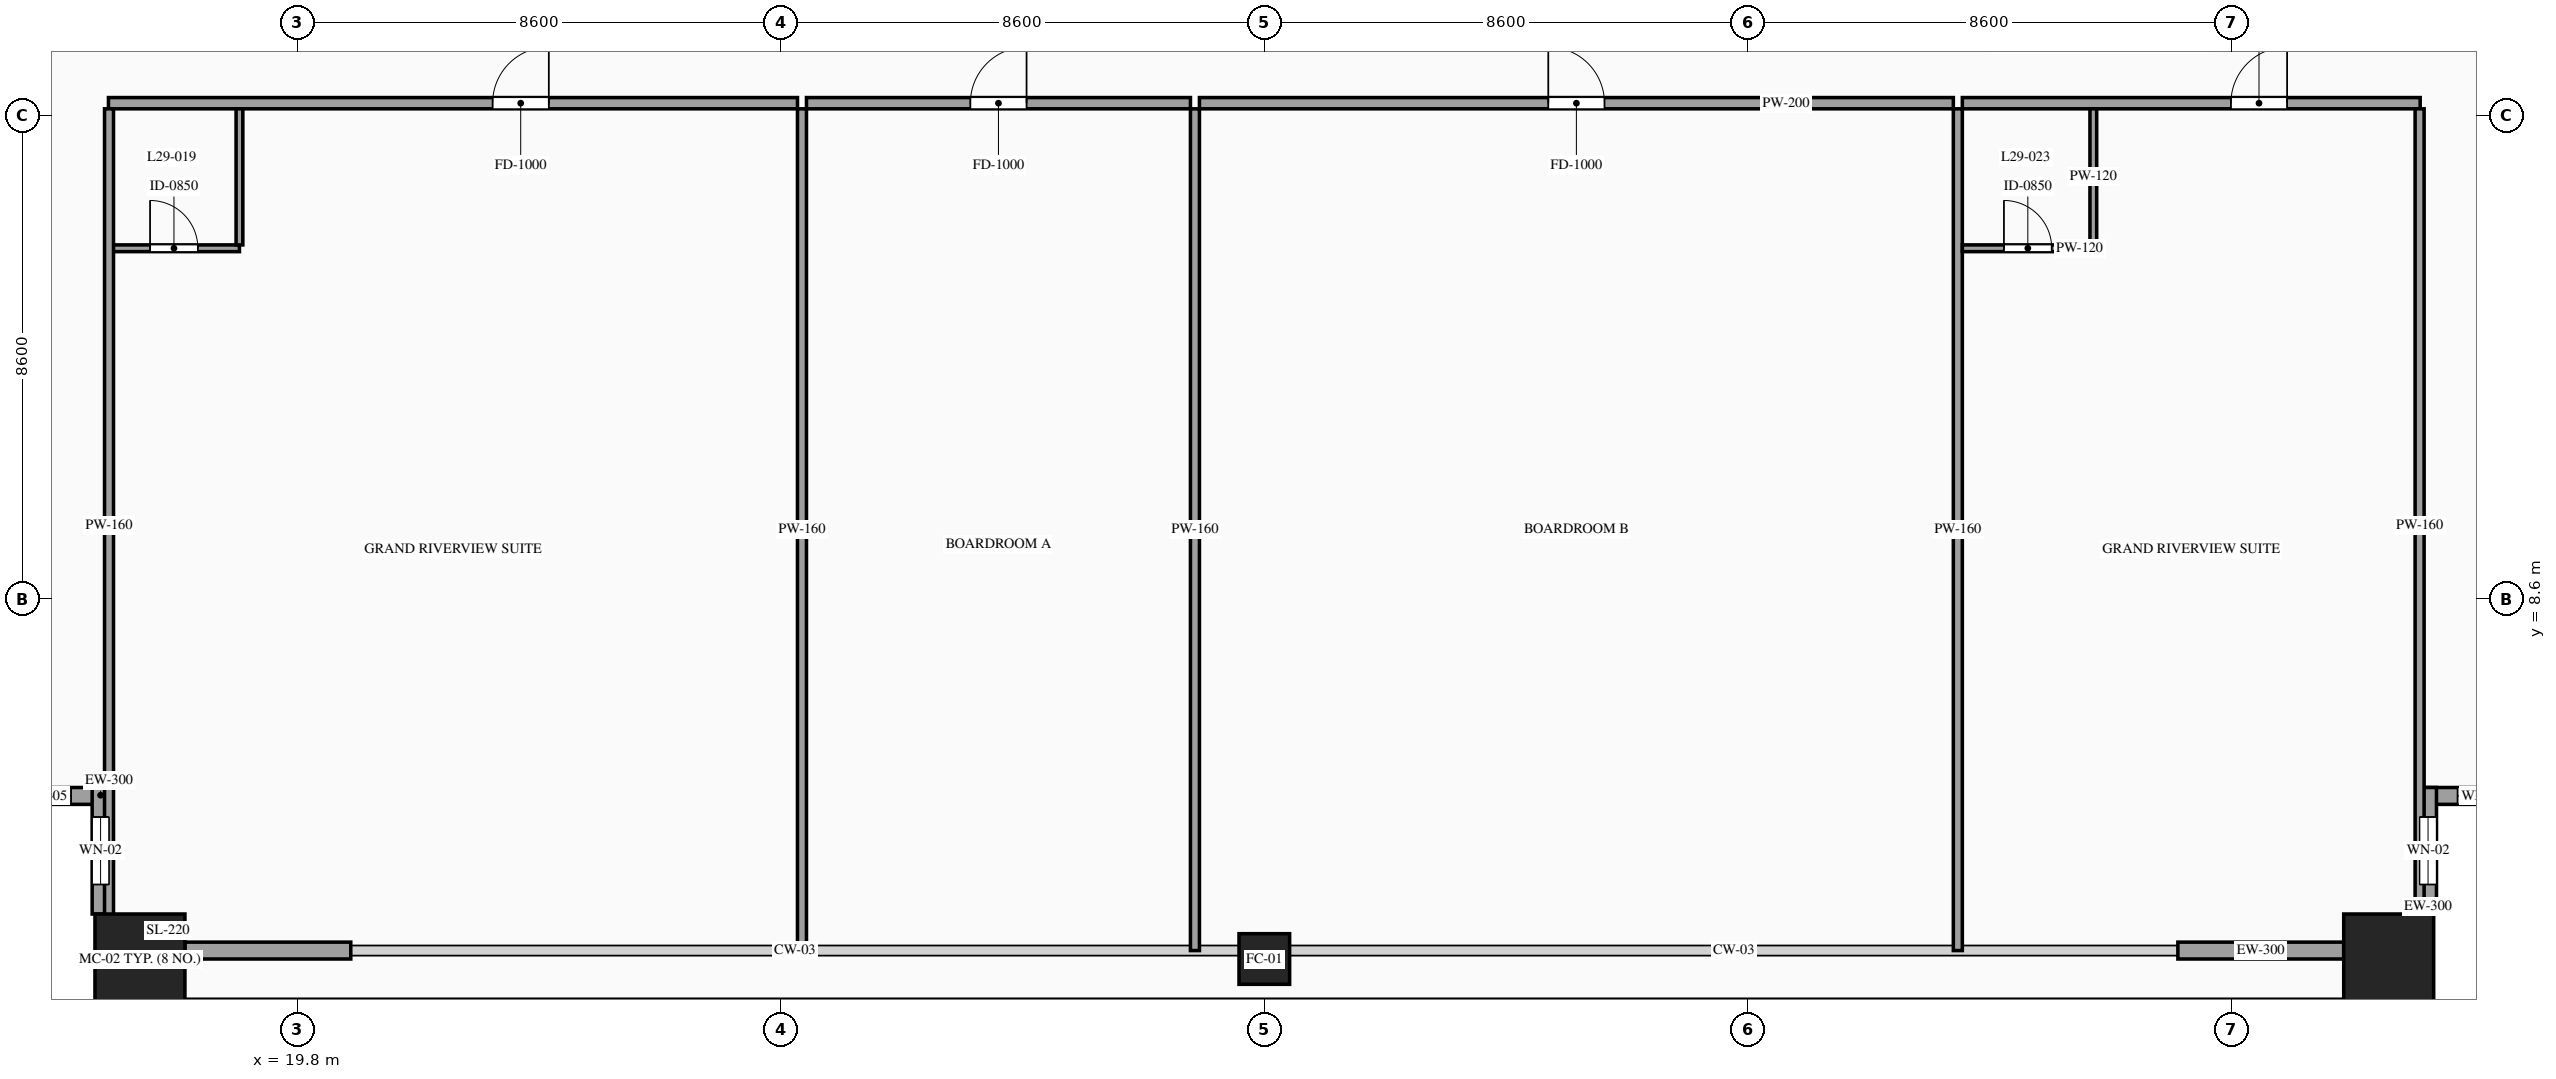
"""IFC4 building model, lengths in metres.
Left out: names, types, materials, properties, quantities, classifications, styles, units other than length and angle.
Written with IfcOpenShell. Run it as: python <this file> out.ifc"""

import sys

from ifc_helpers import new_model, si_unit, direction, frame, frame_2d, origin, origin_2d, place, context, subcontext, project, spatial, rectangle, hollow_rectangle, extrude, source, transform, mapped, element, fill, save


model = new_model("IFC4")
c1 = context("Model", 3, precision=1e-05, world=origin(), true_north=direction((0.0, 1.0)))
c2 = subcontext(c1, "Body", "Model", "MODEL_VIEW")
j1 = project(units=[si_unit("LENGTHUNIT", "METRE"), si_unit("PLANEANGLEUNIT", "RADIAN")], contexts=[c1])
p1 = place(None, origin())
s1 = spatial("IfcSite", under=j1, at=p1, CompositionType="ELEMENT")
p2 = place(p1, origin())
s2 = spatial("IfcBuilding", under=s1, at=p2, CompositionType="ELEMENT")
p3 = place(p2, frame((0.0, 0.0, 111.8)))
s3 = spatial("IfcBuildingStorey", under=s2, at=p3, CompositionType="ELEMENT", Elevation=111.8)
m1 = source(origin(), c2, "Body", "SweptSolid", [
    extrude(hollow_rectangle(XDim=1.6, YDim=1.6, WallThickness=0.07, at=origin_2d()), origin(), (0.0, 0.0, 1.0), 3.6),
])
p4 = place(p3, frame((17.0, 2.2, 0.0), z_axis=(0.0, 0.0, 1.0), x_axis=(1.0, 0.0, 0.0)))
e1 = element("IfcColumn", 1, at=p4, inside=s3, PredefinedType="COLUMN", context=c2, shape_type="MappedRepresentation", body=[
    mapped(m1, transform((0.0, 0.0, 0.0), scale=1.0)),
])
m2 = source(origin(), c2, "Body", "SweptSolid", [
    extrude(hollow_rectangle(XDim=0.9, YDim=0.9, WallThickness=0.042, at=origin_2d()), origin(), (0.0, 0.0, 1.0), 3.6),
])
p5 = place(p3, frame((37.0, 2.2, 0.0), z_axis=(0.0, 0.0, 1.0), x_axis=(1.0, 0.0, 0.0)))
e2 = element("IfcColumn", 2, at=p5, inside=s3, PredefinedType="COLUMN", context=c2, shape_type="MappedRepresentation", body=[
    mapped(m2, transform((0.0, 0.0, 0.0), scale=1.0)),
])
p6 = place(p3, frame((57.0, 2.2, 0.0), z_axis=(0.0, 0.0, 1.0), x_axis=(1.0, 0.0, 0.0)))
e3 = element("IfcColumn", 3, at=p6, inside=s3, PredefinedType="COLUMN", context=c2, shape_type="MappedRepresentation", body=[
    mapped(m1, transform((0.0, 0.0, 0.0), scale=1.0)),
])
p7 = place(p3, frame((14.2, 5.1, 0.0), z_axis=(0.0, 0.0, 1.0), x_axis=(1.0, 0.0, 0.0)))
e4 = element("IfcWall", 4, at=p7, inside=s3, PredefinedType="SOLIDWALL", context=c2, shape_type="SweptSolid", body=[
    extrude(rectangle(XDim=2.25, YDim=0.3, at=frame_2d((1.125, 0.0))), origin(), (0.0, 0.0, 1.0), 3.38),
])
p8 = place(p7, frame((0.675, 0.0, 0.85)))
e5 = element("IfcOpeningElement", 5, at=p8, cuts=e4, PredefinedType="OPENING", context=c2, shape_type="SweptSolid", body=[
    extrude(rectangle(XDim=0.9, YDim=1.5, at=frame_2d((0.45, 0.75))), frame((0.0, 0.165, 0.0), z_axis=(0.0, -1.0, 0.0), x_axis=(1.0, 0.0, 0.0)), (0.0, 0.0, 1.0), 0.33),
])
p9 = place(p3, frame((16.3, 5.25, 0.0), z_axis=(0.0, 0.0, 1.0), x_axis=(0.0, -1.0, 0.0)))
e6 = element("IfcWall", 6, at=p9, inside=s3, PredefinedType="SOLIDWALL", context=c2, shape_type="SweptSolid", body=[
    extrude(rectangle(XDim=2.25, YDim=0.3, at=frame_2d((1.125, 0.0))), origin(), (0.0, 0.0, 1.0), 3.38),
])
p10 = place(p9, frame((0.525, 0.0, 0.85)))
e7 = element("IfcOpeningElement", 7, at=p10, cuts=e6, PredefinedType="OPENING", context=c2, shape_type="SweptSolid", body=[
    extrude(rectangle(XDim=1.2, YDim=2.1, at=frame_2d((0.6, 1.05))), frame((0.0, 0.165, 0.0), z_axis=(0.0, -1.0, 0.0), x_axis=(1.0, 0.0, 0.0)), (0.0, 0.0, 1.0), 0.33),
])
p11 = place(p3, frame((57.55, 5.1, 0.0), z_axis=(0.0, 0.0, 1.0), x_axis=(1.0, 0.0, 0.0)))
e8 = element("IfcWall", 8, at=p11, inside=s3, PredefinedType="SOLIDWALL", context=c2, shape_type="SweptSolid", body=[
    extrude(rectangle(XDim=2.25, YDim=0.3, at=frame_2d((1.125, 0.0))), origin(), (0.0, 0.0, 1.0), 3.38),
])
p12 = place(p11, frame((0.675, 0.0, 0.85)))
e9 = element("IfcOpeningElement", 9, at=p12, cuts=e8, PredefinedType="OPENING", context=c2, shape_type="SweptSolid", body=[
    extrude(rectangle(XDim=0.9, YDim=1.5, at=frame_2d((0.45, 0.75))), frame((0.0, 0.165, 0.0), z_axis=(0.0, -1.0, 0.0), x_axis=(1.0, 0.0, 0.0)), (0.0, 0.0, 1.0), 0.33),
])
p13 = place(p3, frame((57.7, 3.0, 0.0), z_axis=(0.0, 0.0, 1.0), x_axis=(0.0, 1.0, 0.0)))
e10 = element("IfcWall", 10, at=p13, inside=s3, PredefinedType="SOLIDWALL", context=c2, shape_type="SweptSolid", body=[
    extrude(rectangle(XDim=2.25, YDim=0.3, at=frame_2d((1.125, 0.0))), origin(), (0.0, 0.0, 1.0), 3.38),
])
p14 = place(p13, frame((0.525, 0.0, 0.85)))
e11 = element("IfcOpeningElement", 11, at=p14, cuts=e10, PredefinedType="OPENING", context=c2, shape_type="SweptSolid", body=[
    extrude(rectangle(XDim=1.2, YDim=2.1, at=frame_2d((0.6, 1.05))), frame((0.0, 0.165, 0.0), z_axis=(0.0, -1.0, 0.0), x_axis=(1.0, 0.0, 0.0)), (0.0, 0.0, 1.0), 0.33),
])
m3 = source(origin(), c2, "Body", "SweptSolid", [
    extrude(rectangle(XDim=2.95, YDim=0.3, at=frame_2d((1.475, 0.0))), origin(), (0.0, 0.0, 1.0), 2.775),
])
for number, where, z_axis, x_axis in (
    (12, (17.8, 2.35, 0.0), (0.0, 0.0, 1.0), (1.0, 0.0, 0.0)),
    (13, (53.25, 2.35, 0.0), (0.0, 0.0, 1.0), (1.0, 0.0, 0.0)),
):
    element("IfcWall", number, at=place(p3, frame(where, z_axis=z_axis, x_axis=x_axis)), inside=s3, PredefinedType="SOLIDWALL", context=c2, shape_type="MappedRepresentation", body=[
        mapped(m3, transform((0.0, 0.0, 0.0), scale=1.0)),
    ])
p15 = place(p3, frame((16.44, 17.42, 0.0), z_axis=(0.0, 0.0, 1.0), x_axis=(1.0, 0.0, 0.0)))
e14 = element("IfcWall", 14, at=p15, inside=s3, PredefinedType="PARTITIONING", context=c2, shape_type="SweptSolid", body=[
    extrude(rectangle(XDim=12.256, YDim=0.2, at=frame_2d((6.128, 0.0))), origin(), (0.0, 0.0, 1.0), 3.38),
])
p16 = place(p15, frame((6.833, 0.0, 0.0)))
e15 = element("IfcOpeningElement", 15, at=p16, cuts=e14, PredefinedType="OPENING", context=c2, shape_type="SweptSolid", body=[
    extrude(rectangle(XDim=1.0, YDim=2.2, at=frame_2d((0.5, 1.1))), frame((0.0, 0.115, 0.0), z_axis=(0.0, -1.0, 0.0), x_axis=(1.0, 0.0, 0.0)), (0.0, 0.0, 1.0), 0.23),
])
m4 = source(origin(), c2, "Body", "SweptSolid", [
    extrude(rectangle(XDim=14.97, YDim=0.16, at=frame_2d((7.485, 0.0))), origin(), (0.0, 0.0, 1.0), 3.38),
])
p17 = place(p3, frame((28.776, 2.35, 0.0), z_axis=(0.0, 0.0, 1.0), x_axis=(0.0, 1.0, 0.0)))
e16 = element("IfcWall", 16, at=p17, inside=s3, PredefinedType="PARTITIONING", context=c2, shape_type="MappedRepresentation", body=[
    mapped(m4, transform((0.0, 0.0, 0.0), scale=1.0)),
])
p18 = place(p3, frame((16.44, 14.84, 0.0), z_axis=(0.0, 0.0, 1.0), x_axis=(1.0, 0.0, 0.0)))
e17 = element("IfcWall", 17, at=p18, inside=s3, PredefinedType="PARTITIONING", context=c2, shape_type="SweptSolid", body=[
    extrude(rectangle(XDim=2.33, YDim=0.12, at=frame_2d((1.165, 0.0))), origin(), (0.0, 0.0, 1.0), 3.38),
])
p19 = place(p18, frame((0.74, 0.0, 0.0)))
e18 = element("IfcOpeningElement", 18, at=p19, cuts=e17, PredefinedType="OPENING", context=c2, shape_type="SweptSolid", body=[
    extrude(rectangle(XDim=0.85, YDim=2.1, at=frame_2d((0.425, 1.05))), frame((0.0, 0.075, 0.0), z_axis=(0.0, -1.0, 0.0), x_axis=(1.0, 0.0, 0.0)), (0.0, 0.0, 1.0), 0.15),
])
m5 = source(origin(), c2, "Body", "SweptSolid", [
    extrude(rectangle(XDim=2.42, YDim=0.12, at=frame_2d((1.21, 0.0))), origin(), (0.0, 0.0, 1.0), 3.38),
])
p20 = place(p3, frame((18.77, 14.9, 0.0), z_axis=(0.0, 0.0, 1.0), x_axis=(0.0, 1.0, 0.0)))
e19 = element("IfcWall", 19, at=p20, inside=s3, PredefinedType="PARTITIONING", context=c2, shape_type="MappedRepresentation", body=[
    mapped(m5, transform((0.0, 0.0, 0.0), scale=1.0)),
])
p21 = place(p3, frame((28.856, 17.42, 0.0), z_axis=(0.0, 0.0, 1.0), x_axis=(1.0, 0.0, 0.0)))
e20 = element("IfcWall", 20, at=p21, inside=s3, PredefinedType="PARTITIONING", context=c2, shape_type="SweptSolid", body=[
    extrude(rectangle(XDim=6.83, YDim=0.2, at=frame_2d((3.415, 0.0))), origin(), (0.0, 0.0, 1.0), 3.38),
])
p22 = place(p21, frame((2.915, 0.0, 0.0)))
e21 = element("IfcOpeningElement", 21, at=p22, cuts=e20, PredefinedType="OPENING", context=c2, shape_type="SweptSolid", body=[
    extrude(rectangle(XDim=1.0, YDim=2.2, at=frame_2d((0.5, 1.1))), frame((0.0, 0.115, 0.0), z_axis=(0.0, -1.0, 0.0), x_axis=(1.0, 0.0, 0.0)), (0.0, 0.0, 1.0), 0.23),
])
p23 = place(p3, frame((35.766, 2.35, 0.0), z_axis=(0.0, 0.0, 1.0), x_axis=(0.0, 1.0, 0.0)))
e22 = element("IfcWall", 22, at=p23, inside=s3, PredefinedType="PARTITIONING", context=c2, shape_type="MappedRepresentation", body=[
    mapped(m4, transform((0.0, 0.0, 0.0), scale=1.0)),
])
p24 = place(p3, frame((35.846, 17.42, 0.0), z_axis=(0.0, 0.0, 1.0), x_axis=(1.0, 0.0, 0.0)))
e23 = element("IfcWall", 23, at=p24, inside=s3, PredefinedType="PARTITIONING", context=c2, shape_type="SweptSolid", body=[
    extrude(rectangle(XDim=13.41, YDim=0.2, at=frame_2d((6.705, 0.0))), origin(), (0.0, 0.0, 1.0), 3.38),
])
p25 = place(p24, frame((6.205, 0.0, 0.0)))
e24 = element("IfcOpeningElement", 24, at=p25, cuts=e23, PredefinedType="OPENING", context=c2, shape_type="SweptSolid", body=[
    extrude(rectangle(XDim=1.0, YDim=2.2, at=frame_2d((0.5, 1.1))), frame((0.0, 0.115, 0.0), z_axis=(0.0, -1.0, 0.0), x_axis=(1.0, 0.0, 0.0)), (0.0, 0.0, 1.0), 0.23),
])
p26 = place(p3, frame((49.336, 2.35, 0.0), z_axis=(0.0, 0.0, 1.0), x_axis=(0.0, 1.0, 0.0)))
e25 = element("IfcWall", 25, at=p26, inside=s3, PredefinedType="PARTITIONING", context=c2, shape_type="MappedRepresentation", body=[
    mapped(m4, transform((0.0, 0.0, 0.0), scale=1.0)),
])
p27 = place(p3, frame((49.416, 17.42, 0.0), z_axis=(0.0, 0.0, 1.0), x_axis=(1.0, 0.0, 0.0)))
e26 = element("IfcWall", 26, at=p27, inside=s3, PredefinedType="PARTITIONING", context=c2, shape_type="SweptSolid", body=[
    extrude(rectangle(XDim=8.144, YDim=0.2, at=frame_2d((4.072, 0.0))), origin(), (0.0, 0.0, 1.0), 3.38),
])
p28 = place(p27, frame((4.777, 0.0, 0.0)))
e27 = element("IfcOpeningElement", 27, at=p28, cuts=e26, PredefinedType="OPENING", context=c2, shape_type="SweptSolid", body=[
    extrude(rectangle(XDim=1.0, YDim=2.2, at=frame_2d((0.5, 1.1))), frame((0.0, 0.115, 0.0), z_axis=(0.0, -1.0, 0.0), x_axis=(1.0, 0.0, 0.0)), (0.0, 0.0, 1.0), 0.23),
])
m6 = source(origin(), c2, "Body", "SweptSolid", [
    extrude(rectangle(XDim=14.82, YDim=0.16, at=frame_2d((7.41, 0.0))), origin(), (0.0, 0.0, 1.0), 3.38),
])
for number, where, z_axis, x_axis in (
    (28, (16.45, 2.5, 0.0), (0.0, 0.0, 1.0), (0.0, 1.0, 0.0)),
    (29, (57.55, 2.5, 0.0), (0.0, 0.0, 1.0), (0.0, 1.0, 0.0)),
):
    element("IfcWall", number, at=place(p3, frame(where, z_axis=z_axis, x_axis=x_axis)), inside=s3, PredefinedType="PARTITIONING", context=c2, shape_type="MappedRepresentation", body=[
        mapped(m6, transform((0.0, 0.0, 0.0), scale=1.0)),
    ])
p29 = place(p3, frame((49.416, 14.84, 0.0), z_axis=(0.0, 0.0, 1.0), x_axis=(1.0, 0.0, 0.0)))
e30 = element("IfcWall", 30, at=p29, inside=s3, PredefinedType="PARTITIONING", context=c2, shape_type="SweptSolid", body=[
    extrude(rectangle(XDim=2.33, YDim=0.12, at=frame_2d((1.165, 0.0))), origin(), (0.0, 0.0, 1.0), 3.38),
])
p30 = place(p29, frame((0.74, 0.0, 0.0)))
e31 = element("IfcOpeningElement", 31, at=p30, cuts=e30, PredefinedType="OPENING", context=c2, shape_type="SweptSolid", body=[
    extrude(rectangle(XDim=0.85, YDim=2.1, at=frame_2d((0.425, 1.05))), frame((0.0, 0.075, 0.0), z_axis=(0.0, -1.0, 0.0), x_axis=(1.0, 0.0, 0.0)), (0.0, 0.0, 1.0), 0.15),
])
p31 = place(p3, frame((51.746, 14.9, 0.0), z_axis=(0.0, 0.0, 1.0), x_axis=(0.0, 1.0, 0.0)))
e32 = element("IfcWall", 32, at=p31, inside=s3, PredefinedType="PARTITIONING", context=c2, shape_type="MappedRepresentation", body=[
    mapped(m5, transform((0.0, 0.0, 0.0), scale=1.0)),
])
m7 = source(origin(), c2, "Body", "SweptSolid", [
    extrude(rectangle(XDim=0.9, YDim=1.5, at=frame_2d((0.45, 0.75))), frame((0.0, 0.03, 0.0), z_axis=(0.0, -1.0, 0.0), x_axis=(1.0, 0.0, 0.0)), (0.0, 0.0, 1.0), 0.06),
])
p32 = place(p8, origin())
e33 = element("IfcWindow", 33, at=p32, inside=s3, PartitioningType="SINGLE_PANEL", PredefinedType="WINDOW", context=c2, shape_type="MappedRepresentation", body=[
    mapped(m7, transform((0.0, 0.0, 0.0), scale=1.0)),
])
fill(e5, e33)
m8 = source(origin(), c2, "Body", "SweptSolid", [
    extrude(rectangle(XDim=1.2, YDim=2.1, at=frame_2d((0.6, 1.05))), frame((0.0, 0.03, 0.0), z_axis=(0.0, -1.0, 0.0), x_axis=(1.0, 0.0, 0.0)), (0.0, 0.0, 1.0), 0.06),
])
p33 = place(p10, origin())
e34 = element("IfcWindow", 34, at=p33, inside=s3, PartitioningType="SINGLE_PANEL", PredefinedType="WINDOW", context=c2, shape_type="MappedRepresentation", body=[
    mapped(m8, transform((0.0, 0.0, 0.0), scale=1.0)),
])
fill(e7, e34)
p34 = place(p12, origin())
e35 = element("IfcWindow", 35, at=p34, inside=s3, PartitioningType="SINGLE_PANEL", PredefinedType="WINDOW", context=c2, shape_type="MappedRepresentation", body=[
    mapped(m7, transform((0.0, 0.0, 0.0), scale=1.0)),
])
fill(e9, e35)
p35 = place(p14, origin())
e36 = element("IfcWindow", 36, at=p35, inside=s3, PartitioningType="SINGLE_PANEL", PredefinedType="WINDOW", context=c2, shape_type="MappedRepresentation", body=[
    mapped(m8, transform((0.0, 0.0, 0.0), scale=1.0)),
])
fill(e11, e36)
m9 = source(origin(), c2, "Body", "SweptSolid", [
    extrude(rectangle(XDim=1.0, YDim=2.2, at=frame_2d((0.5, 1.1))), frame((0.0, 0.025, 0.0), z_axis=(0.0, -1.0, 0.0), x_axis=(1.0, 0.0, 0.0)), (0.0, 0.0, 1.0), 0.05),
])
p36 = place(p16, origin())
e37 = element("IfcDoor", 37, at=p36, inside=s3, OperationType="SINGLE_SWING_RIGHT", PredefinedType="DOOR", context=c2, shape_type="MappedRepresentation", body=[
    mapped(m9, transform((0.0, 0.0, 0.0), scale=1.0)),
])
fill(e15, e37)
m10 = source(origin(), c2, "Body", "SweptSolid", [
    extrude(rectangle(XDim=0.85, YDim=2.1, at=frame_2d((0.425, 1.05))), frame((0.0, 0.025, 0.0), z_axis=(0.0, -1.0, 0.0), x_axis=(1.0, 0.0, 0.0)), (0.0, 0.0, 1.0), 0.05),
])
p37 = place(p19, origin())
e38 = element("IfcDoor", 38, at=p37, inside=s3, OperationType="SINGLE_SWING_LEFT", PredefinedType="DOOR", context=c2, shape_type="MappedRepresentation", body=[
    mapped(m10, transform((0.0, 0.0, 0.0), scale=1.0)),
])
fill(e18, e38)
p38 = place(p22, origin())
e39 = element("IfcDoor", 39, at=p38, inside=s3, OperationType="SINGLE_SWING_RIGHT", PredefinedType="DOOR", context=c2, shape_type="MappedRepresentation", body=[
    mapped(m9, transform((0.0, 0.0, 0.0), scale=1.0)),
])
fill(e21, e39)
p39 = place(p25, origin())
e40 = element("IfcDoor", 40, at=p39, inside=s3, OperationType="SINGLE_SWING_LEFT", PredefinedType="DOOR", context=c2, shape_type="MappedRepresentation", body=[
    mapped(m9, transform((0.0, 0.0, 0.0), scale=1.0)),
])
fill(e24, e40)
p40 = place(p28, origin())
e41 = element("IfcDoor", 41, at=p40, inside=s3, OperationType="SINGLE_SWING_RIGHT", PredefinedType="DOOR", context=c2, shape_type="MappedRepresentation", body=[
    mapped(m9, transform((0.0, 0.0, 0.0), scale=1.0)),
])
fill(e27, e41)
p41 = place(p30, origin())
e42 = element("IfcDoor", 42, at=p41, inside=s3, OperationType="SINGLE_SWING_LEFT", PredefinedType="DOOR", context=c2, shape_type="MappedRepresentation", body=[
    mapped(m10, transform((0.0, 0.0, 0.0), scale=1.0)),
])
fill(e31, e42)
save(model, sys.argv[1])
